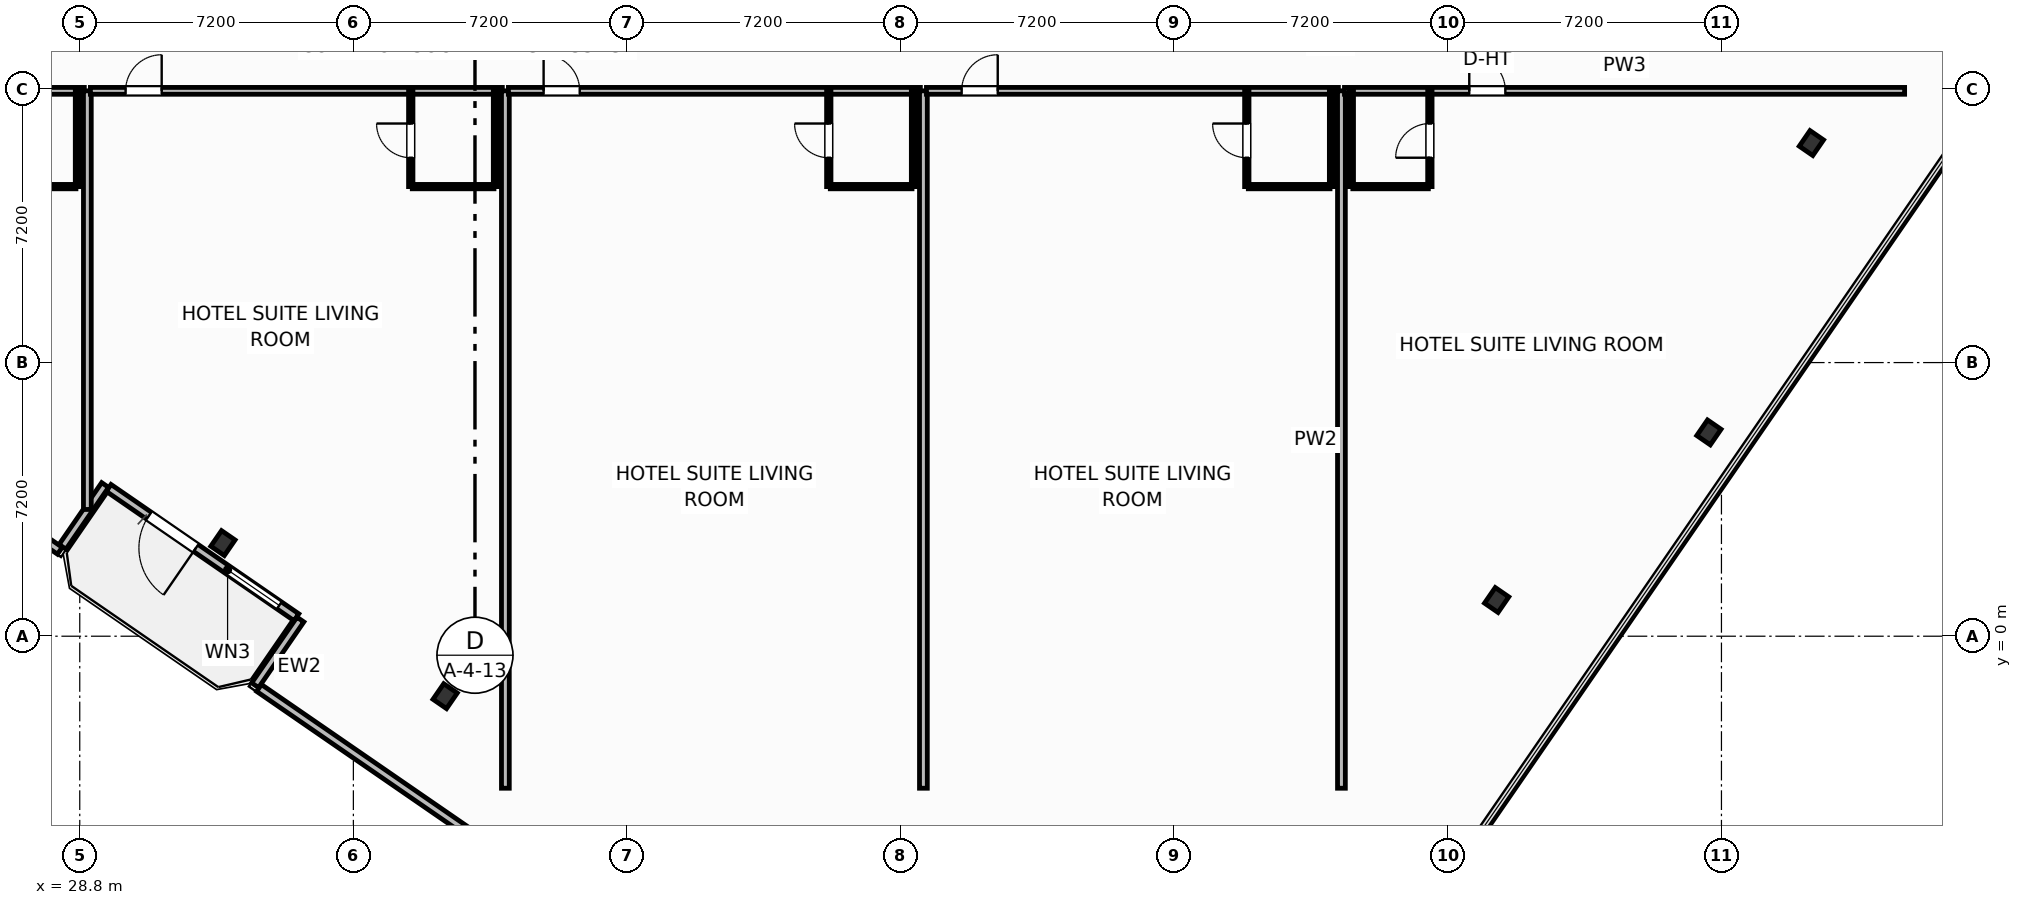
"""IFC4 building model, lengths in metres.
Left out: names, types, materials, properties, quantities, classifications, styles, units other than length and angle.
Written with IfcOpenShell. Run it as: python <this file> out.ifc"""

import sys

from ifc_helpers import new_model, si_unit, direction, frame, frame_2d, origin, origin_2d, place, context, subcontext, project, spatial, rectangle, i_section, extrude, element, fill, save


model = new_model("IFC4")
c1 = context("Model", 3, precision=1e-05, world=origin(), true_north=direction((0.0, 1.0)))
c2 = subcontext(c1, "Body", "Model", "MODEL_VIEW")
j1 = project(units=[si_unit("LENGTHUNIT", "METRE"), si_unit("PLANEANGLEUNIT", "RADIAN")], contexts=[c1])
p1 = place(None, origin())
s1 = spatial("IfcSite", under=j1, at=p1, CompositionType="ELEMENT")
p2 = place(p1, origin())
s2 = spatial("IfcBuilding", under=s1, at=p2, CompositionType="ELEMENT")
p3 = place(p2, frame((0.0, 0.0, 45.5)))
s3 = spatial("IfcBuildingStorey", under=s2, at=p3, CompositionType="ELEMENT", Elevation=45.5)
for number, where, z_axis, x_axis in (
    (1, (32.568, 2.45, 0.0), (0.0, 0.0, 1.0), (0.824, -0.567, 0.0)),
    (2, (38.415, -1.577, 0.0), (0.0, 0.0, 1.0), (0.824, -0.567, 0.0)),
    (3, (66.085, 0.953, 0.0), (0.0, 0.0, 1.0), (0.824, -0.567, 0.0)),
    (4, (71.67, 5.363, 0.0), (0.0, 0.0, 1.0), (0.824, -0.567, 0.0)),
    (5, (74.367, 12.976, 0.0), (0.0, 0.0, 1.0), (0.824, -0.567, 0.0)),
):
    element("IfcColumn", number, at=place(p3, frame(where, z_axis=z_axis, x_axis=x_axis)), inside=s3, PredefinedType="COLUMN", context=c2, shape_type="SweptSolid", body=[
        extrude(i_section(OverallWidth=0.432, OverallDepth=0.498, WebThickness=0.056, FlangeThickness=0.089, FilletRadius=0.025, at=origin_2d()), origin(), (0.0, 0.0, 1.0), 3.7),
    ])
p4 = place(p3, frame((34.502, 0.499, 0.0), z_axis=(0.0, 0.0, 1.0), x_axis=(-0.823534636215, 0.567265989598, 0.0)))
e6 = element("IfcWall", 6, at=p4, inside=s3, PredefinedType="SOLIDWALL", context=c2, shape_type="SweptSolid", body=[
    extrude(rectangle(XDim=6.0, YDim=0.22, at=frame_2d((3.0, 0.0))), origin(), (0.0, 0.0, 1.0), 2.73),
])
p5 = place(p4, frame((3.212, 0.0, 0.0)))
e7 = element("IfcOpeningElement", 7, at=p5, cuts=e6, PredefinedType="OPENING", context=c2, shape_type="SweptSolid", body=[
    extrude(rectangle(XDim=1.5, YDim=2.25, at=frame_2d((0.75, 1.125))), frame((0.0, 0.12, 0.0), z_axis=(0.0, -1.0, 0.0), x_axis=(1.0, 0.0, 0.0)), (0.0, 0.0, 1.0), 0.24),
])
p6 = place(p4, frame((0.55, 0.0, 0.75)))
e8 = element("IfcOpeningElement", 8, at=p6, cuts=e6, PredefinedType="OPENING", context=c2, shape_type="SweptSolid", body=[
    extrude(rectangle(XDim=1.65, YDim=1.65, at=frame_2d((0.825, 0.825))), frame((0.0, 0.12, 0.0), z_axis=(0.0, -1.0, 0.0), x_axis=(1.0, 0.0, 0.0)), (0.0, 0.0, 1.0), 0.24),
])
p7 = place(p3, frame((21.659, 6.807, 0.0), z_axis=(0.0, 0.0, 1.0), x_axis=(0.823535360023, -0.567264938799, 0.0)))
e9 = element("IfcWall", 9, at=p7, inside=s3, PredefinedType="SOLIDWALL", context=c2, shape_type="SweptSolid", body=[
    extrude(rectangle(XDim=8.035, YDim=0.22, at=frame_2d((4.018, 0.0))), origin(), (0.0, 0.0, 1.0), 2.73),
])
p8 = place(p7, frame((3.192, 0.0, 0.8)))
e10 = element("IfcOpeningElement", 10, at=p8, cuts=e9, PredefinedType="OPENING", context=c2, shape_type="SweptSolid", body=[
    extrude(rectangle(XDim=1.65, YDim=1.65, at=frame_2d((0.825, 0.825))), frame((0.0, 0.12, 0.0), z_axis=(0.0, -1.0, 0.0), x_axis=(1.0, 0.0, 0.0)), (0.0, 0.0, 1.0), 0.24),
])
p9 = place(p3, frame((28.347, 2.352, 0.0), z_axis=(0.0, 0.0, 1.0), x_axis=(0.567215821234, 0.823569190865, 0.0)))
e11 = element("IfcWall", 11, at=p9, inside=s3, PredefinedType="SOLIDWALL", context=c2, shape_type="SweptSolid", body=[
    extrude(rectangle(XDim=1.975, YDim=0.22, at=frame_2d((0.988, 0.0))), origin(), (0.0, 0.0, 1.0), 2.73),
])
p10 = place(p3, frame((34.606, 0.439, 0.0), z_axis=(0.0, 0.0, 1.0), x_axis=(-0.567219383419, -0.823566737474, 0.0)))
e12 = element("IfcWall", 12, at=p10, inside=s3, PredefinedType="SOLIDWALL", context=c2, shape_type="SweptSolid", body=[
    extrude(rectangle(XDim=2.1, YDim=0.22, at=frame_2d((1.05, 0.0))), origin(), (0.0, 0.0, 1.0), 2.73),
])
p11 = place(p3, frame((33.518, -1.362, 0.0), z_axis=(0.0, 0.0, 1.0), x_axis=(0.82353935489, -0.567259139148, 0.0)))
e13 = element("IfcWall", 13, at=p11, inside=s3, PredefinedType="SOLIDWALL", context=c2, shape_type="SweptSolid", body=[
    extrude(rectangle(XDim=23.147, YDim=0.22, at=frame_2d((11.573, 0.0))), origin(), (0.0, 0.0, 1.0), 2.73),
])
p12 = place(p11, frame((10.749, 0.0, 0.8)))
e14 = element("IfcOpeningElement", 14, at=p12, cuts=e13, PredefinedType="OPENING", context=c2, shape_type="SweptSolid", body=[
    extrude(rectangle(XDim=1.65, YDim=1.65, at=frame_2d((0.825, 0.825))), frame((0.0, 0.12, 0.0), z_axis=(0.0, -1.0, 0.0), x_axis=(1.0, 0.0, 0.0)), (0.0, 0.0, 1.0), 0.24),
])
p13 = place(p3, frame((18.08, 14.35, 0.0), z_axis=(0.0, 0.0, 1.0), x_axis=(1.0, 0.0, 0.0)))
e15 = element("IfcWall", 15, at=p13, inside=s3, PredefinedType="PARTITIONING", context=c2, shape_type="SweptSolid", body=[
    extrude(rectangle(XDim=10.84, YDim=0.18, at=frame_2d((5.42, 0.0))), origin(), (0.0, 0.0, 1.0), 3.45),
])
p14 = place(p13, frame((6.68, 0.0, 0.0)))
e16 = element("IfcOpeningElement", 16, at=p14, cuts=e15, PredefinedType="OPENING", context=c2, shape_type="SweptSolid", body=[
    extrude(rectangle(XDim=0.95, YDim=2.15, at=frame_2d((0.475, 1.075))), frame((0.0, 0.1, 0.0), z_axis=(0.0, -1.0, 0.0), x_axis=(1.0, 0.0, 0.0)), (0.0, 0.0, 1.0), 0.2),
])
p15 = place(p3, frame((26.55, 11.83, 0.0), z_axis=(0.0, 0.0, 1.0), x_axis=(1.0, 0.0, 0.0)))
e17 = element("IfcWall", 17, at=p15, inside=s3, PredefinedType="PARTITIONING", context=c2, shape_type="SweptSolid", body=[
    extrude(rectangle(XDim=2.15, YDim=0.115, at=frame_2d((1.075, 0.0))), origin(), (0.0, 0.0, 1.0), 3.45),
])
p16 = place(p3, frame((28.74, 11.83, 0.0), z_axis=(0.0, 0.0, 1.0), x_axis=(0.0, 1.0, 0.0)))
e18 = element("IfcWall", 18, at=p16, inside=s3, PredefinedType="PARTITIONING", context=c2, shape_type="SweptSolid", body=[
    extrude(rectangle(XDim=2.52, YDim=0.115, at=frame_2d((1.26, 0.0))), origin(), (0.0, 0.0, 1.0), 3.45),
])
p17 = place(p3, frame((29.0, 3.335, 0.0), z_axis=(0.0, 0.0, 1.0), x_axis=(0.0, 1.0, 0.0)))
e19 = element("IfcWall", 19, at=p17, inside=s3, PredefinedType="PARTITIONING", context=c2, shape_type="SweptSolid", body=[
    extrude(rectangle(XDim=11.015, YDim=0.205, at=frame_2d((5.507, 0.0))), origin(), (0.0, 0.0, 1.0), 3.45),
])
p18 = place(p3, frame((29.08, 14.35, 0.0), z_axis=(0.0, 0.0, 1.0), x_axis=(1.0, 0.0, 0.0)))
e20 = element("IfcWall", 20, at=p18, inside=s3, PredefinedType="PARTITIONING", context=c2, shape_type="SweptSolid", body=[
    extrude(rectangle(XDim=10.84, YDim=0.18, at=frame_2d((5.42, 0.0))), origin(), (0.0, 0.0, 1.0), 3.45),
])
p19 = place(p18, frame((0.926, 0.0, 0.0)))
e21 = element("IfcOpeningElement", 21, at=p19, cuts=e20, PredefinedType="OPENING", context=c2, shape_type="SweptSolid", body=[
    extrude(rectangle(XDim=0.95, YDim=2.15, at=frame_2d((0.475, 1.075))), frame((0.0, 0.1, 0.0), z_axis=(0.0, -1.0, 0.0), x_axis=(1.0, 0.0, 0.0)), (0.0, 0.0, 1.0), 0.2),
])
p20 = place(p3, frame((37.55, 11.83, 0.0), z_axis=(0.0, 0.0, 1.0), x_axis=(1.0, 0.0, 0.0)))
e22 = element("IfcWall", 22, at=p20, inside=s3, PredefinedType="PARTITIONING", context=c2, shape_type="SweptSolid", body=[
    extrude(rectangle(XDim=2.15, YDim=0.115, at=frame_2d((1.075, 0.0))), origin(), (0.0, 0.0, 1.0), 3.45),
])
p21 = place(p3, frame((37.51, 11.83, 0.0), z_axis=(0.0, 0.0, 1.0), x_axis=(0.0, 1.0, 0.0)))
e23 = element("IfcWall", 23, at=p21, inside=s3, PredefinedType="PARTITIONING", context=c2, shape_type="SweptSolid", body=[
    extrude(rectangle(XDim=2.52, YDim=0.115, at=frame_2d((1.26, 0.0))), origin(), (0.0, 0.0, 1.0), 3.45),
])
p22 = place(p21, frame((0.76, 0.0, 0.0)))
e24 = element("IfcOpeningElement", 24, at=p22, cuts=e23, PredefinedType="OPENING", context=c2, shape_type="SweptSolid", body=[
    extrude(rectangle(XDim=0.9, YDim=2.05, at=frame_2d((0.45, 1.025))), frame((0.0, 0.067, 0.0), z_axis=(0.0, -1.0, 0.0), x_axis=(1.0, 0.0, 0.0)), (0.0, 0.0, 1.0), 0.135),
])
p23 = place(p3, frame((39.74, 11.83, 0.0), z_axis=(0.0, 0.0, 1.0), x_axis=(0.0, 1.0, 0.0)))
e25 = element("IfcWall", 25, at=p23, inside=s3, PredefinedType="PARTITIONING", context=c2, shape_type="SweptSolid", body=[
    extrude(rectangle(XDim=2.52, YDim=0.115, at=frame_2d((1.26, 0.0))), origin(), (0.0, 0.0, 1.0), 3.45),
])
p24 = place(p3, frame((40.0, -4.0, 0.0), z_axis=(0.0, 0.0, 1.0), x_axis=(0.0, 1.0, 0.0)))
e26 = element("IfcWall", 26, at=p24, inside=s3, PredefinedType="PARTITIONING", context=c2, shape_type="SweptSolid", body=[
    extrude(rectangle(XDim=18.35, YDim=0.205, at=frame_2d((9.175, 0.0))), origin(), (0.0, 0.0, 1.0), 2.58),
])
p25 = place(p3, frame((40.08, 14.35, 0.0), z_axis=(0.0, 0.0, 1.0), x_axis=(1.0, 0.0, 0.0)))
e27 = element("IfcWall", 27, at=p25, inside=s3, PredefinedType="PARTITIONING", context=c2, shape_type="SweptSolid", body=[
    extrude(rectangle(XDim=10.84, YDim=0.18, at=frame_2d((5.42, 0.0))), origin(), (0.0, 0.0, 1.0), 3.45),
])
p26 = place(p25, frame((0.926, 0.0, 0.0)))
e28 = element("IfcOpeningElement", 28, at=p26, cuts=e27, PredefinedType="OPENING", context=c2, shape_type="SweptSolid", body=[
    extrude(rectangle(XDim=0.95, YDim=2.15, at=frame_2d((0.475, 1.075))), frame((0.0, 0.1, 0.0), z_axis=(0.0, -1.0, 0.0), x_axis=(1.0, 0.0, 0.0)), (0.0, 0.0, 1.0), 0.2),
])
p27 = place(p3, frame((48.55, 11.83, 0.0), z_axis=(0.0, 0.0, 1.0), x_axis=(1.0, 0.0, 0.0)))
e29 = element("IfcWall", 29, at=p27, inside=s3, PredefinedType="PARTITIONING", context=c2, shape_type="SweptSolid", body=[
    extrude(rectangle(XDim=2.15, YDim=0.115, at=frame_2d((1.075, 0.0))), origin(), (0.0, 0.0, 1.0), 3.45),
])
p28 = place(p3, frame((48.51, 11.83, 0.0), z_axis=(0.0, 0.0, 1.0), x_axis=(0.0, 1.0, 0.0)))
e30 = element("IfcWall", 30, at=p28, inside=s3, PredefinedType="PARTITIONING", context=c2, shape_type="SweptSolid", body=[
    extrude(rectangle(XDim=2.52, YDim=0.115, at=frame_2d((1.26, 0.0))), origin(), (0.0, 0.0, 1.0), 3.45),
])
p29 = place(p28, frame((0.76, 0.0, 0.0)))
e31 = element("IfcOpeningElement", 31, at=p29, cuts=e30, PredefinedType="OPENING", context=c2, shape_type="SweptSolid", body=[
    extrude(rectangle(XDim=0.9, YDim=2.05, at=frame_2d((0.45, 1.025))), frame((0.0, 0.067, 0.0), z_axis=(0.0, -1.0, 0.0), x_axis=(1.0, 0.0, 0.0)), (0.0, 0.0, 1.0), 0.135),
])
p30 = place(p3, frame((50.74, 11.83, 0.0), z_axis=(0.0, 0.0, 1.0), x_axis=(0.0, 1.0, 0.0)))
e32 = element("IfcWall", 32, at=p30, inside=s3, PredefinedType="PARTITIONING", context=c2, shape_type="SweptSolid", body=[
    extrude(rectangle(XDim=2.52, YDim=0.115, at=frame_2d((1.26, 0.0))), origin(), (0.0, 0.0, 1.0), 3.45),
])
p31 = place(p3, frame((51.0, -4.0, 0.0), z_axis=(0.0, 0.0, 1.0), x_axis=(0.0, 1.0, 0.0)))
e33 = element("IfcWall", 33, at=p31, inside=s3, PredefinedType="PARTITIONING", context=c2, shape_type="SweptSolid", body=[
    extrude(rectangle(XDim=18.35, YDim=0.205, at=frame_2d((9.175, 0.0))), origin(), (0.0, 0.0, 1.0), 3.45),
])
p32 = place(p3, frame((51.08, 14.35, 0.0), z_axis=(0.0, 0.0, 1.0), x_axis=(1.0, 0.0, 0.0)))
e34 = element("IfcWall", 34, at=p32, inside=s3, PredefinedType="PARTITIONING", context=c2, shape_type="SweptSolid", body=[
    extrude(rectangle(XDim=10.84, YDim=0.18, at=frame_2d((5.42, 0.0))), origin(), (0.0, 0.0, 1.0), 3.45),
])
p33 = place(p32, frame((0.926, 0.0, 0.0)))
e35 = element("IfcOpeningElement", 35, at=p33, cuts=e34, PredefinedType="OPENING", context=c2, shape_type="SweptSolid", body=[
    extrude(rectangle(XDim=0.95, YDim=2.15, at=frame_2d((0.475, 1.075))), frame((0.0, 0.1, 0.0), z_axis=(0.0, -1.0, 0.0), x_axis=(1.0, 0.0, 0.0)), (0.0, 0.0, 1.0), 0.2),
])
p34 = place(p3, frame((59.55, 11.83, 0.0), z_axis=(0.0, 0.0, 1.0), x_axis=(1.0, 0.0, 0.0)))
e36 = element("IfcWall", 36, at=p34, inside=s3, PredefinedType="PARTITIONING", context=c2, shape_type="SweptSolid", body=[
    extrude(rectangle(XDim=2.15, YDim=0.115, at=frame_2d((1.075, 0.0))), origin(), (0.0, 0.0, 1.0), 3.45),
])
p35 = place(p3, frame((59.51, 11.83, 0.0), z_axis=(0.0, 0.0, 1.0), x_axis=(0.0, 1.0, 0.0)))
e37 = element("IfcWall", 37, at=p35, inside=s3, PredefinedType="PARTITIONING", context=c2, shape_type="SweptSolid", body=[
    extrude(rectangle(XDim=2.52, YDim=0.115, at=frame_2d((1.26, 0.0))), origin(), (0.0, 0.0, 1.0), 3.45),
])
p36 = place(p35, frame((0.76, 0.0, 0.0)))
e38 = element("IfcOpeningElement", 38, at=p36, cuts=e37, PredefinedType="OPENING", context=c2, shape_type="SweptSolid", body=[
    extrude(rectangle(XDim=0.9, YDim=2.05, at=frame_2d((0.45, 1.025))), frame((0.0, 0.067, 0.0), z_axis=(0.0, -1.0, 0.0), x_axis=(1.0, 0.0, 0.0)), (0.0, 0.0, 1.0), 0.135),
])
p37 = place(p3, frame((61.74, 11.83, 0.0), z_axis=(0.0, 0.0, 1.0), x_axis=(0.0, 1.0, 0.0)))
e39 = element("IfcWall", 39, at=p37, inside=s3, PredefinedType="PARTITIONING", context=c2, shape_type="SweptSolid", body=[
    extrude(rectangle(XDim=2.52, YDim=0.115, at=frame_2d((1.26, 0.0))), origin(), (0.0, 0.0, 1.0), 3.45),
])
p38 = place(p3, frame((62.0, -4.0, 0.0), z_axis=(0.0, 0.0, 1.0), x_axis=(0.0, 1.0, 0.0)))
e40 = element("IfcWall", 40, at=p38, inside=s3, PredefinedType="PARTITIONING", context=c2, shape_type="SweptSolid", body=[
    extrude(rectangle(XDim=18.35, YDim=0.205, at=frame_2d((9.175, 0.0))), origin(), (0.0, 0.0, 1.0), 3.45),
])
p39 = place(p3, frame((62.08, 14.35, 0.0), z_axis=(0.0, 0.0, 1.0), x_axis=(1.0, 0.0, 0.0)))
e41 = element("IfcWall", 41, at=p39, inside=s3, PredefinedType="PARTITIONING", context=c2, shape_type="SweptSolid", body=[
    extrude(rectangle(XDim=14.74, YDim=0.18, at=frame_2d((7.37, 0.0))), origin(), (0.0, 0.0, 1.0), 2.58),
])
p40 = place(p39, frame((3.284, 0.0, 0.0)))
e42 = element("IfcOpeningElement", 42, at=p40, cuts=e41, PredefinedType="OPENING", context=c2, shape_type="SweptSolid", body=[
    extrude(rectangle(XDim=0.95, YDim=2.15, at=frame_2d((0.475, 1.075))), frame((0.0, 0.1, 0.0), z_axis=(0.0, -1.0, 0.0), x_axis=(1.0, 0.0, 0.0)), (0.0, 0.0, 1.0), 0.2),
])
p41 = place(p3, frame((62.3, 11.83, 0.0), z_axis=(0.0, 0.0, 1.0), x_axis=(1.0, 0.0, 0.0)))
e43 = element("IfcWall", 43, at=p41, inside=s3, PredefinedType="PARTITIONING", context=c2, shape_type="SweptSolid", body=[
    extrude(rectangle(XDim=1.987, YDim=0.115, at=frame_2d((0.994, 0.0))), origin(), (0.0, 0.0, 1.0), 3.45),
])
p42 = place(p3, frame((64.327, 11.83, 0.0), z_axis=(0.0, 0.0, 1.0), x_axis=(0.0, 1.0, 0.0)))
e44 = element("IfcWall", 44, at=p42, inside=s3, PredefinedType="PARTITIONING", context=c2, shape_type="SweptSolid", body=[
    extrude(rectangle(XDim=2.52, YDim=0.115, at=frame_2d((1.26, 0.0))), origin(), (0.0, 0.0, 1.0), 3.45),
])
p43 = place(p42, frame((0.76, 0.0, 0.0)))
e45 = element("IfcOpeningElement", 45, at=p43, cuts=e44, PredefinedType="OPENING", context=c2, shape_type="SweptSolid", body=[
    extrude(rectangle(XDim=0.9, YDim=2.05, at=frame_2d((0.45, 1.025))), frame((0.0, 0.067, 0.0), z_axis=(0.0, -1.0, 0.0), x_axis=(1.0, 0.0, 0.0)), (0.0, 0.0, 1.0), 0.135),
])
p44 = place(p3, frame((62.26, 11.83, 0.0), z_axis=(0.0, 0.0, 1.0), x_axis=(0.0, 1.0, 0.0)))
e46 = element("IfcWall", 46, at=p44, inside=s3, PredefinedType="PARTITIONING", context=c2, shape_type="SweptSolid", body=[
    extrude(rectangle(XDim=2.52, YDim=0.115, at=frame_2d((1.26, 0.0))), origin(), (0.0, 0.0, 1.0), 3.45),
])
p45 = place(p5, origin())
e47 = element("IfcDoor", 47, at=p45, inside=s3, OperationType="SINGLE_SWING_LEFT", PredefinedType="DOOR", context=c2, shape_type="SweptSolid", body=[
    extrude(rectangle(XDim=1.5, YDim=2.25, at=frame_2d((0.75, 1.125))), frame((0.0, 0.025, 0.0), z_axis=(0.0, -1.0, 0.0), x_axis=(1.0, 0.0, 0.0)), (0.0, 0.0, 1.0), 0.05),
])
fill(e7, e47)
p46 = place(p6, origin())
e48 = element("IfcWindow", 48, at=p46, inside=s3, PartitioningType="SINGLE_PANEL", PredefinedType="WINDOW", context=c2, shape_type="SweptSolid", body=[
    extrude(rectangle(XDim=1.65, YDim=1.65, at=frame_2d((0.825, 0.825))), frame((0.0, 0.03, 0.0), z_axis=(0.0, -1.0, 0.0), x_axis=(1.0, 0.0, 0.0)), (0.0, 0.0, 1.0), 0.06),
])
fill(e8, e48)
p47 = place(p19, origin())
e49 = element("IfcDoor", 49, at=p47, inside=s3, OperationType="SINGLE_SWING_RIGHT", PredefinedType="DOOR", context=c2, shape_type="SweptSolid", body=[
    extrude(rectangle(XDim=0.95, YDim=2.15, at=frame_2d((0.475, 1.075))), frame((0.0, 0.025, 0.0), z_axis=(0.0, -1.0, 0.0), x_axis=(1.0, 0.0, 0.0)), (0.0, 0.0, 1.0), 0.05),
])
fill(e21, e49)
p48 = place(p22, origin())
e50 = element("IfcDoor", 50, at=p48, inside=s3, OperationType="SINGLE_SWING_RIGHT", PredefinedType="DOOR", context=c2, shape_type="SweptSolid", body=[
    extrude(rectangle(XDim=0.9, YDim=2.05, at=frame_2d((0.45, 1.025))), frame((0.0, 0.025, 0.0), z_axis=(0.0, -1.0, 0.0), x_axis=(1.0, 0.0, 0.0)), (0.0, 0.0, 1.0), 0.05),
])
fill(e24, e50)
p49 = place(p26, origin())
e51 = element("IfcDoor", 51, at=p49, inside=s3, OperationType="SINGLE_SWING_LEFT", PredefinedType="DOOR", context=c2, shape_type="SweptSolid", body=[
    extrude(rectangle(XDim=0.95, YDim=2.15, at=frame_2d((0.475, 1.075))), frame((0.0, 0.025, 0.0), z_axis=(0.0, -1.0, 0.0), x_axis=(1.0, 0.0, 0.0)), (0.0, 0.0, 1.0), 0.05),
])
fill(e28, e51)
p50 = place(p29, origin())
e52 = element("IfcDoor", 52, at=p50, inside=s3, OperationType="SINGLE_SWING_RIGHT", PredefinedType="DOOR", context=c2, shape_type="SweptSolid", body=[
    extrude(rectangle(XDim=0.9, YDim=2.05, at=frame_2d((0.45, 1.025))), frame((0.0, 0.025, 0.0), z_axis=(0.0, -1.0, 0.0), x_axis=(1.0, 0.0, 0.0)), (0.0, 0.0, 1.0), 0.05),
])
fill(e31, e52)
p51 = place(p33, origin())
e53 = element("IfcDoor", 53, at=p51, inside=s3, OperationType="SINGLE_SWING_RIGHT", PredefinedType="DOOR", context=c2, shape_type="SweptSolid", body=[
    extrude(rectangle(XDim=0.95, YDim=2.15, at=frame_2d((0.475, 1.075))), frame((0.0, 0.025, 0.0), z_axis=(0.0, -1.0, 0.0), x_axis=(1.0, 0.0, 0.0)), (0.0, 0.0, 1.0), 0.05),
])
fill(e35, e53)
p52 = place(p36, origin())
e54 = element("IfcDoor", 54, at=p52, inside=s3, OperationType="SINGLE_SWING_RIGHT", PredefinedType="DOOR", context=c2, shape_type="SweptSolid", body=[
    extrude(rectangle(XDim=0.9, YDim=2.05, at=frame_2d((0.45, 1.025))), frame((0.0, 0.025, 0.0), z_axis=(0.0, -1.0, 0.0), x_axis=(1.0, 0.0, 0.0)), (0.0, 0.0, 1.0), 0.05),
])
fill(e38, e54)
p53 = place(p40, origin())
e55 = element("IfcDoor", 55, at=p53, inside=s3, OperationType="SINGLE_SWING_LEFT", PredefinedType="DOOR", context=c2, shape_type="SweptSolid", body=[
    extrude(rectangle(XDim=0.95, YDim=2.15, at=frame_2d((0.475, 1.075))), frame((0.0, 0.025, 0.0), z_axis=(0.0, -1.0, 0.0), x_axis=(1.0, 0.0, 0.0)), (0.0, 0.0, 1.0), 0.05),
])
fill(e42, e55)
p54 = place(p43, origin())
e56 = element("IfcDoor", 56, at=p54, inside=s3, OperationType="SINGLE_SWING_LEFT", PredefinedType="DOOR", context=c2, shape_type="SweptSolid", body=[
    extrude(rectangle(XDim=0.9, YDim=2.05, at=frame_2d((0.45, 1.025))), frame((0.0, 0.025, 0.0), z_axis=(0.0, -1.0, 0.0), x_axis=(1.0, 0.0, 0.0)), (0.0, 0.0, 1.0), 0.05),
])
fill(e45, e56)
save(model, sys.argv[1])
